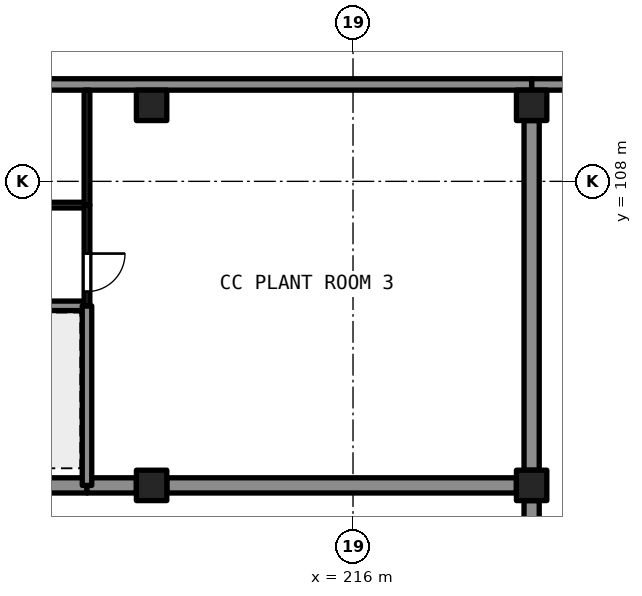
"""IFC4 building model, lengths in metres.
Left out: names, types, materials, properties, quantities, classifications, styles, units other than length and angle.
Written with IfcOpenShell. Run it as: python <this file> out.ifc"""

import sys

from ifc_helpers import new_model, si_unit, direction, frame, frame_2d, origin, origin_2d, place, context, subcontext, project, spatial, rectangle, extrude, element, fill, save


model = new_model("IFC4")
c1 = context("Model", 3, precision=1e-05, world=origin(), true_north=direction((0.0, 1.0)))
c2 = subcontext(c1, "Body", "Model", "MODEL_VIEW")
j1 = project(units=[si_unit("LENGTHUNIT", "METRE"), si_unit("PLANEANGLEUNIT", "RADIAN")], contexts=[c1])
p1 = place(None, origin())
s1 = spatial("IfcSite", under=j1, at=p1, CompositionType="ELEMENT")
p2 = place(p1, origin())
s2 = spatial("IfcBuilding", under=s1, at=p2, CompositionType="ELEMENT")
p3 = place(p2, frame((0.0, 0.0, 20.4)))
s3 = spatial("IfcBuildingStorey", under=s2, at=p3, CompositionType="ELEMENT", Elevation=20.4)
for number, where, z_axis, x_axis in (
    (1, (210.7, 100.0, 0.0), (0.0, 0.0, 1.0), (1.0, 0.0, 0.0)),
    (2, (210.7, 110.0, 0.0), (0.0, 0.0, 1.0), (1.0, 0.0, 0.0)),
    (3, (220.7, 100.0, 0.0), (0.0, 0.0, 1.0), (1.0, 0.0, 0.0)),
    (4, (220.7, 110.0, 0.0), (0.0, 0.0, 1.0), (1.0, 0.0, 0.0)),
):
    element("IfcColumn", number, at=place(p3, frame(where, z_axis=z_axis, x_axis=x_axis)), inside=s3, PredefinedType="COLUMN", context=c2, shape_type="SweptSolid", body=[
        extrude(rectangle(XDim=0.8, YDim=0.8, at=origin_2d()), origin(), (0.0, 0.0, 1.0), 4.59),
    ])
p4 = place(p3, frame((201.1, 100.0, 0.0), z_axis=(0.0, 0.0, 1.0), x_axis=(1.0, 0.0, 0.0)))
e5 = element("IfcWall", 5, at=p4, inside=s3, PredefinedType="SHEAR", context=c2, shape_type="SweptSolid", body=[
    extrude(rectangle(XDim=7.9, YDim=0.4, at=frame_2d((3.95, 0.0))), origin(), (0.0, 0.0, 1.0), 4.59),
])
p5 = place(p3, frame((209.0, 100.0, 0.0), z_axis=(0.0, 0.0, 1.0), x_axis=(1.0, 0.0, 0.0)))
e6 = element("IfcWall", 6, at=p5, inside=s3, PredefinedType="SHEAR", context=c2, shape_type="SweptSolid", body=[
    extrude(rectangle(XDim=1.3, YDim=0.4, at=frame_2d((0.65, 0.0))), origin(), (0.0, 0.0, 1.0), 4.59),
])
p6 = place(p3, frame((211.1, 100.0, 0.0), z_axis=(0.0, 0.0, 1.0), x_axis=(1.0, 0.0, 0.0)))
e7 = element("IfcWall", 7, at=p6, inside=s3, PredefinedType="SHEAR", context=c2, shape_type="SweptSolid", body=[
    extrude(rectangle(XDim=9.2, YDim=0.4, at=frame_2d((4.6, 0.0))), origin(), (0.0, 0.0, 1.0), 4.59),
])
for number, where, z_axis, x_axis in (
    (8, (220.7, 90.4, 0.0), (0.0, 0.0, 1.0), (0.0, 1.0, 0.0)),
    (9, (220.7, 100.4, 0.0), (0.0, 0.0, 1.0), (0.0, 1.0, 0.0)),
):
    element("IfcWall", number, at=place(p3, frame(where, z_axis=z_axis, x_axis=x_axis)), inside=s3, PredefinedType="SHEAR", context=c2, shape_type="SweptSolid", body=[
        extrude(rectangle(XDim=9.2, YDim=0.4, at=frame_2d((4.6, 0.0))), origin(), (0.0, 0.0, 1.0), 4.59),
    ])
p7 = place(p3, frame((220.7, 110.55, 0.0), z_axis=(0.0, 0.0, 1.0), x_axis=(1.0, 0.0, 0.0)))
e10 = element("IfcWall", 10, at=p7, inside=s3, PredefinedType="SOLIDWALL", context=c2, shape_type="SweptSolid", body=[
    extrude(rectangle(XDim=30.55, YDim=0.3, at=frame_2d((15.275, 0.0))), origin(), (0.0, 0.0, 1.0), 4.59),
])
p8 = place(p3, frame((170.7, 110.55, 0.0), z_axis=(0.0, 0.0, 1.0), x_axis=(1.0, 0.0, 0.0)))
e11 = element("IfcWall", 11, at=p8, inside=s3, PredefinedType="SOLIDWALL", context=c2, shape_type="SweptSolid", body=[
    extrude(rectangle(XDim=50.0, YDim=0.3, at=frame_2d((25.0, 0.0))), origin(), (0.0, 0.0, 1.0), 4.59),
])
p9 = place(p8, frame((3.7, 0.0, 0.9)))
e12 = element("IfcOpeningElement", 12, at=p9, cuts=e11, PredefinedType="OPENING", context=c2, shape_type="SweptSolid", body=[
    extrude(rectangle(XDim=2.4, YDim=1.8, at=frame_2d((1.2, 0.9))), frame((0.0, 0.161, 0.0), z_axis=(0.0, -1.0, 0.0), x_axis=(1.0, 0.0, 0.0)), (0.0, 0.0, 1.0), 0.321),
])
p10 = place(p8, frame((13.7, 0.0, 0.9)))
e13 = element("IfcOpeningElement", 13, at=p10, cuts=e11, PredefinedType="OPENING", context=c2, shape_type="SweptSolid", body=[
    extrude(rectangle(XDim=2.4, YDim=1.8, at=frame_2d((1.2, 0.9))), frame((0.0, 0.161, 0.0), z_axis=(0.0, -1.0, 0.0), x_axis=(1.0, 0.0, 0.0)), (0.0, 0.0, 1.0), 0.321),
])
p11 = place(p3, frame((199.85, 104.725, 0.0), z_axis=(0.0, 0.0, 1.0), x_axis=(1.0, 0.0, 0.0)))
e14 = element("IfcWall", 14, at=p11, inside=s3, PredefinedType="SHEAR", context=c2, shape_type="SweptSolid", body=[
    extrude(rectangle(XDim=9.15, YDim=0.25, at=frame_2d((4.575, 0.0))), origin(), (0.0, 0.0, 1.0), 4.59),
])
p12 = place(p11, frame((0.425, 0.0, 0.0)))
e15 = element("IfcOpeningElement", 15, at=p12, cuts=e14, PredefinedType="OPENING", context=c2, shape_type="SweptSolid", body=[
    extrude(rectangle(XDim=2.4, YDim=2.1, at=frame_2d((1.2, 1.05))), frame((0.0, 0.135, 0.0), z_axis=(0.0, -1.0, 0.0), x_axis=(1.0, 0.0, 0.0)), (0.0, 0.0, 1.0), 0.271),
])
p13 = place(p3, frame((209.0, 100.0, 0.0), z_axis=(0.0, 0.0, 1.0), x_axis=(0.0, 1.0, 0.0)))
e16 = element("IfcWall", 16, at=p13, inside=s3, PredefinedType="SHEAR", context=c2, shape_type="SweptSolid", body=[
    extrude(rectangle(XDim=4.725, YDim=0.25, at=frame_2d((2.363, 0.0))), origin(), (0.0, 0.0, 1.0), 4.59),
])
p14 = place(p3, frame((209.0, 107.375, 0.0), z_axis=(0.0, 0.0, 1.0), x_axis=(-1.0, 0.0, 0.0)))
e17 = element("IfcWall", 17, at=p14, inside=s3, PredefinedType="PARTITIONING", context=c2, shape_type="SweptSolid", body=[
    extrude(rectangle(XDim=38.3, YDim=0.15, at=frame_2d((19.15, 0.0))), origin(), (0.0, 0.0, 1.0), 4.59),
])
p15 = place(p14, frame((32.85, 0.0, 0.0)))
e18 = element("IfcOpeningElement", 18, at=p15, cuts=e17, PredefinedType="OPENING", context=c2, shape_type="SweptSolid", body=[
    extrude(rectangle(XDim=1.0, YDim=2.1, at=frame_2d((0.5, 1.05))), frame((0.0, 0.085, 0.0), z_axis=(0.0, -1.0, 0.0), x_axis=(1.0, 0.0, 0.0)), (0.0, 0.0, 1.0), 0.171),
])
p16 = place(p14, frame((22.85, 0.0, 0.0)))
e19 = element("IfcOpeningElement", 19, at=p16, cuts=e17, PredefinedType="OPENING", context=c2, shape_type="SweptSolid", body=[
    extrude(rectangle(XDim=1.0, YDim=2.1, at=frame_2d((0.5, 1.05))), frame((0.0, 0.085, 0.0), z_axis=(0.0, -1.0, 0.0), x_axis=(1.0, 0.0, 0.0)), (0.0, 0.0, 1.0), 0.171),
])
p17 = place(p14, frame((13.35, 0.0, 0.0)))
e20 = element("IfcOpeningElement", 20, at=p17, cuts=e17, PredefinedType="OPENING", context=c2, shape_type="SweptSolid", body=[
    extrude(rectangle(XDim=1.0, YDim=2.1, at=frame_2d((0.5, 1.05))), frame((0.0, 0.085, 0.0), z_axis=(0.0, -1.0, 0.0), x_axis=(1.0, 0.0, 0.0)), (0.0, 0.0, 1.0), 0.171),
])
p18 = place(p14, frame((3.95, 0.0, 0.0)))
e21 = element("IfcOpeningElement", 21, at=p18, cuts=e17, PredefinedType="OPENING", context=c2, shape_type="SweptSolid", body=[
    extrude(rectangle(XDim=1.0, YDim=2.1, at=frame_2d((0.5, 1.05))), frame((0.0, 0.085, 0.0), z_axis=(0.0, -1.0, 0.0), x_axis=(1.0, 0.0, 0.0)), (0.0, 0.0, 1.0), 0.171),
])
p19 = place(p3, frame((209.0, 104.725, 0.0), z_axis=(0.0, 0.0, 1.0), x_axis=(0.0, 1.0, 0.0)))
e22 = element("IfcWall", 22, at=p19, inside=s3, PredefinedType="PARTITIONING", context=c2, shape_type="SweptSolid", body=[
    extrude(rectangle(XDim=2.65, YDim=0.15, at=frame_2d((1.325, 0.0))), origin(), (0.0, 0.0, 1.0), 4.59),
])
p20 = place(p19, frame((0.375, 0.0, 0.0)))
e23 = element("IfcOpeningElement", 23, at=p20, cuts=e22, PredefinedType="OPENING", context=c2, shape_type="SweptSolid", body=[
    extrude(rectangle(XDim=1.0, YDim=2.1, at=frame_2d((0.5, 1.05))), frame((0.0, 0.085, 0.0), z_axis=(0.0, -1.0, 0.0), x_axis=(1.0, 0.0, 0.0)), (0.0, 0.0, 1.0), 0.171),
])
p21 = place(p3, frame((209.0, 107.375, 0.0), z_axis=(0.0, 0.0, 1.0), x_axis=(0.0, 1.0, 0.0)))
e24 = element("IfcWall", 24, at=p21, inside=s3, PredefinedType="PARTITIONING", context=c2, shape_type="SweptSolid", body=[
    extrude(rectangle(XDim=3.025, YDim=0.15, at=frame_2d((1.512, 0.0))), origin(), (0.0, 0.0, 1.0), 4.59),
])
p22 = place(p20, origin())
e25 = element("IfcDoor", 25, at=p22, inside=s3, OperationType="SINGLE_SWING_RIGHT", PredefinedType="DOOR", context=c2, shape_type="SweptSolid", body=[
    extrude(rectangle(XDim=1.0, YDim=2.1, at=frame_2d((0.5, 1.05))), frame((0.0, 0.025, 0.0), z_axis=(0.0, -1.0, 0.0), x_axis=(1.0, 0.0, 0.0)), (0.0, 0.0, 1.0), 0.05),
])
fill(e23, e25)
save(model, sys.argv[1])
